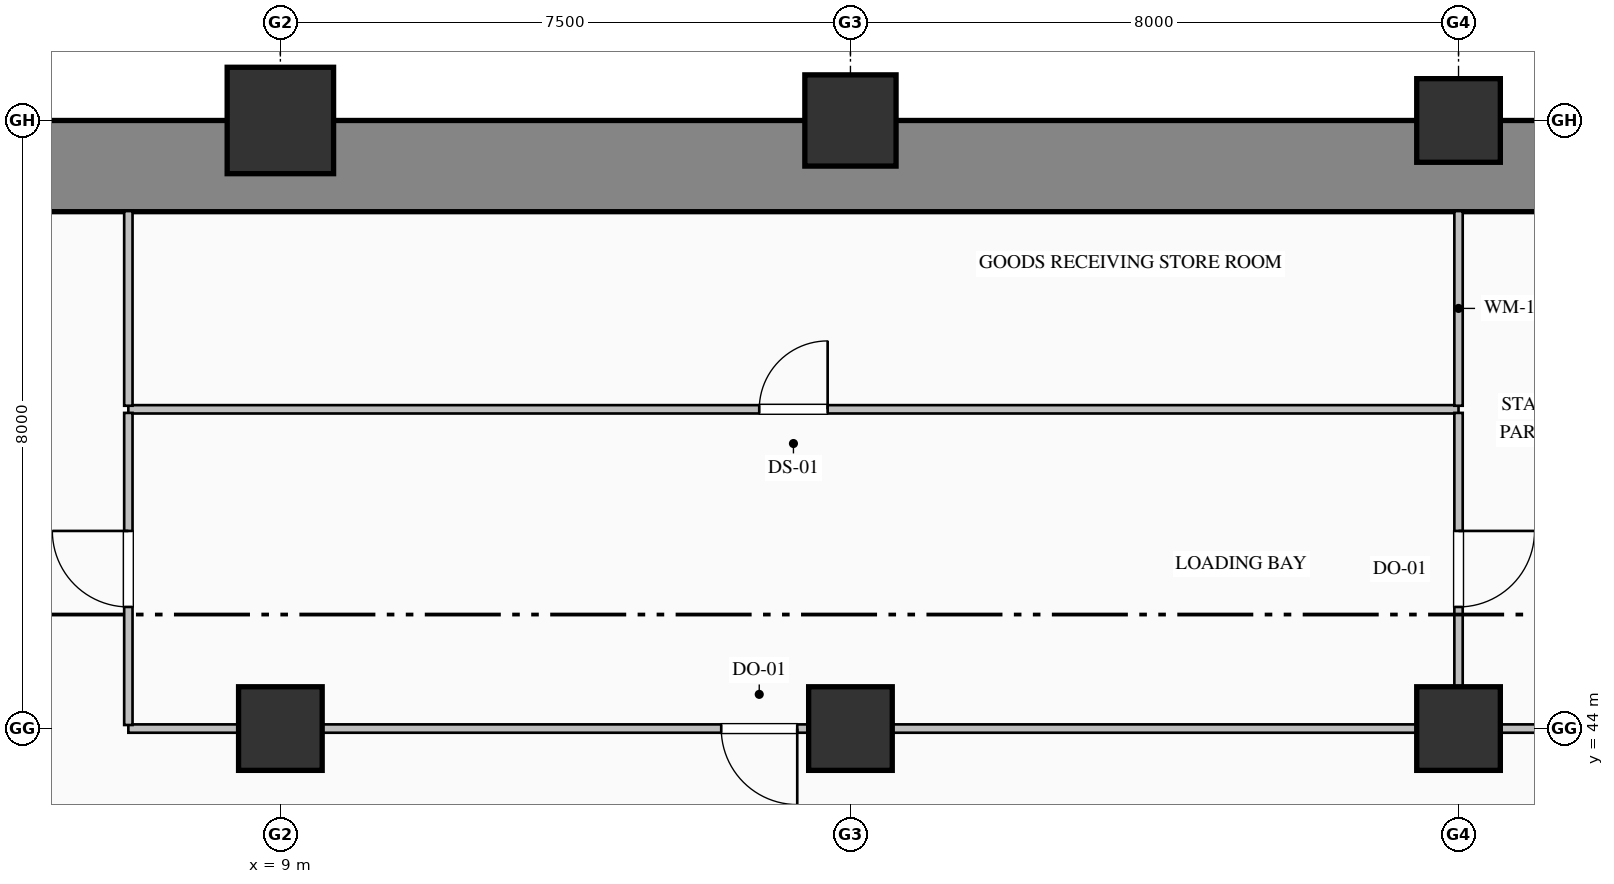
"""IFC4 building model, lengths in metres.
Left out: names, types, materials, properties, quantities, classifications, styles, units other than length and angle.
Written with IfcOpenShell. Run it as: python <this file> out.ifc"""

import sys

from ifc_helpers import new_model, si_unit, direction, frame, frame_2d, origin, origin_2d, place, context, subcontext, project, spatial, rectangle, hollow_rectangle, hollow_circle, extrude, element, fill, save


model = new_model("IFC4")
c1 = context("Model", 3, precision=1e-05, world=origin(), true_north=direction((0.0, 1.0)))
c2 = subcontext(c1, "Body", "Model", "MODEL_VIEW")
j1 = project(units=[si_unit("LENGTHUNIT", "METRE"), si_unit("PLANEANGLEUNIT", "RADIAN")], contexts=[c1])
p1 = place(None, origin())
s1 = spatial("IfcSite", under=j1, at=p1, CompositionType="ELEMENT")
p2 = place(p1, origin())
s2 = spatial("IfcBuilding", under=s1, at=p2, CompositionType="ELEMENT")
p3 = place(p2, frame((0.0, 0.0, -4.6)))
s3 = spatial("IfcBuildingStorey", under=s2, at=p3, CompositionType="ELEMENT", Elevation=-4.6)
p4 = place(p3, frame((-1.2, 51.4, 0.0), z_axis=(0.0, 0.0, 1.0), x_axis=(1.0, 0.0, 0.0)))
e1 = element("IfcWall", 1, at=p4, inside=s3, PredefinedType="USERDEFINED", context=c2, shape_type="SweptSolid", body=[
    extrude(rectangle(XDim=41.7, YDim=1.2, at=frame_2d((20.85, 0.0))), origin(), (0.0, 0.0, 1.0), 4.45),
])
p5 = place(p3, frame((9.0, 44.0, 0.0), z_axis=(0.0, 0.0, 1.0), x_axis=(1.0, 0.0, 0.0)))
e2 = element("IfcColumn", 2, at=p5, inside=s3, PredefinedType="COLUMN", context=c2, shape_type="SweptSolid", body=[
    extrude(rectangle(XDim=1.1, YDim=1.1, at=origin_2d()), origin(), (0.0, 0.0, 1.0), 4.6),
])
p6 = place(p3, frame((9.0, 52.0, 0.0), z_axis=(0.0, 0.0, 1.0), x_axis=(1.0, 0.0, 0.0)))
e3 = element("IfcColumn", 3, at=p6, inside=s3, PredefinedType="COLUMN", context=c2, shape_type="SweptSolid", body=[
    extrude(hollow_rectangle(XDim=1.4, YDim=1.4, WallThickness=0.05, at=origin_2d()), origin(), (0.0, 0.0, 1.0), 4.6),
])
p7 = place(p3, frame((16.5, 44.0, 0.0), z_axis=(0.0, 0.0, 1.0), x_axis=(1.0, 0.0, 0.0)))
e4 = element("IfcColumn", 4, at=p7, inside=s3, PredefinedType="COLUMN", context=c2, shape_type="SweptSolid", body=[
    extrude(rectangle(XDim=1.1, YDim=1.1, at=origin_2d()), origin(), (0.0, 0.0, 1.0), 4.6),
])
p8 = place(p3, frame((16.5, 52.0, 0.0), z_axis=(0.0, 0.0, 1.0), x_axis=(1.0, 0.0, 0.0)))
e5 = element("IfcColumn", 5, at=p8, inside=s3, PredefinedType="COLUMN", context=c2, shape_type="SweptSolid", body=[
    extrude(hollow_circle(Radius=0.6, WallThickness=0.04, at=origin_2d()), origin(), (0.0, 0.0, 1.0), 4.6),
])
p9 = place(p3, frame((24.5, 44.0, 0.0), z_axis=(0.0, 0.0, 1.0), x_axis=(1.0, 0.0, 0.0)))
e6 = element("IfcColumn", 6, at=p9, inside=s3, PredefinedType="COLUMN", context=c2, shape_type="SweptSolid", body=[
    extrude(rectangle(XDim=1.1, YDim=1.1, at=origin_2d()), origin(), (0.0, 0.0, 1.0), 4.6),
])
p10 = place(p3, frame((24.5, 52.0, 0.0), z_axis=(0.0, 0.0, 1.0), x_axis=(1.0, 0.0, 0.0)))
e7 = element("IfcColumn", 7, at=p10, inside=s3, PredefinedType="COLUMN", context=c2, shape_type="SweptSolid", body=[
    extrude(hollow_rectangle(XDim=1.1, YDim=1.1, WallThickness=0.04, at=origin_2d()), origin(), (0.0, 0.0, 1.0), 4.6),
])
p11 = place(p3, frame((7.0, 48.2, 0.0), z_axis=(0.0, 0.0, 1.0), x_axis=(1.0, 0.0, 0.0)))
e8 = element("IfcWall", 8, at=p11, inside=s3, PredefinedType="MOVABLE", context=c2, shape_type="SweptSolid", body=[
    extrude(rectangle(XDim=17.5, YDim=0.11, at=frame_2d((8.75, 0.0))), origin(), (0.0, 0.0, 1.0), 4.18),
])
p12 = place(p11, frame((8.3, 0.0, 0.0)))
e9 = element("IfcOpeningElement", 9, at=p12, cuts=e8, PredefinedType="OPENING", context=c2, shape_type="SweptSolid", body=[
    extrude(rectangle(XDim=0.9, YDim=2.15, at=frame_2d((0.45, 1.075))), frame((0.0, 0.065, 0.0), z_axis=(0.0, -1.0, 0.0), x_axis=(1.0, 0.0, 0.0)), (0.0, 0.0, 1.0), 0.13),
])
p13 = place(p3, frame((24.5, 48.153, 0.0), z_axis=(0.0, 0.0, 1.0), x_axis=(0.0, -1.0, 0.0)))
e10 = element("IfcWall", 10, at=p13, inside=s3, PredefinedType="MOVABLE", context=c2, shape_type="SweptSolid", body=[
    extrude(rectangle(XDim=4.106, YDim=0.11, at=frame_2d((2.053, 0.0))), origin(), (0.0, 0.0, 1.0), 3.272),
])
p14 = place(p13, frame((1.553, 0.0, 0.0)))
e11 = element("IfcOpeningElement", 11, at=p14, cuts=e10, PredefinedType="OPENING", context=c2, shape_type="SweptSolid", body=[
    extrude(rectangle(XDim=1.0, YDim=2.15, at=frame_2d((0.5, 1.075))), frame((0.0, 0.065, 0.0), z_axis=(0.0, -1.0, 0.0), x_axis=(1.0, 0.0, 0.0)), (0.0, 0.0, 1.0), 0.13),
])
p15 = place(p3, frame((24.5, 44.0, 0.0), z_axis=(0.0, 0.0, 1.0), x_axis=(-1.0, 0.0, 0.0)))
e12 = element("IfcWall", 12, at=p15, inside=s3, PredefinedType="MOVABLE", context=c2, shape_type="SweptSolid", body=[
    extrude(rectangle(XDim=17.5, YDim=0.11, at=frame_2d((8.75, 0.0))), origin(), (0.0, 0.0, 1.0), 3.272),
])
p16 = place(p15, frame((8.7, 0.0, 0.0)))
e13 = element("IfcOpeningElement", 13, at=p16, cuts=e12, PredefinedType="OPENING", context=c2, shape_type="SweptSolid", body=[
    extrude(rectangle(XDim=1.0, YDim=2.15, at=frame_2d((0.5, 1.075))), frame((0.0, 0.065, 0.0), z_axis=(0.0, -1.0, 0.0), x_axis=(1.0, 0.0, 0.0)), (0.0, 0.0, 1.0), 0.13),
])
p17 = place(p3, frame((7.0, 44.047, 0.0), z_axis=(0.0, 0.0, 1.0), x_axis=(0.0, 1.0, 0.0)))
e14 = element("IfcWall", 14, at=p17, inside=s3, PredefinedType="MOVABLE", context=c2, shape_type="SweptSolid", body=[
    extrude(rectangle(XDim=4.106, YDim=0.11, at=frame_2d((2.053, 0.0))), origin(), (0.0, 0.0, 1.0), 4.18),
])
p18 = place(p17, frame((1.553, 0.0, 0.0)))
e15 = element("IfcOpeningElement", 15, at=p18, cuts=e14, PredefinedType="OPENING", context=c2, shape_type="SweptSolid", body=[
    extrude(rectangle(XDim=1.0, YDim=2.15, at=frame_2d((0.5, 1.075))), frame((0.0, 0.065, 0.0), z_axis=(0.0, -1.0, 0.0), x_axis=(1.0, 0.0, 0.0)), (0.0, 0.0, 1.0), 0.13),
])
p19 = place(p3, frame((24.5, 50.808, 0.0), z_axis=(0.0, 0.0, 1.0), x_axis=(0.0, -1.0, 0.0)))
e16 = element("IfcWall", 16, at=p19, inside=s3, PredefinedType="MOVABLE", context=c2, shape_type="SweptSolid", body=[
    extrude(rectangle(XDim=2.561, YDim=0.11, at=frame_2d((1.281, 0.0))), origin(), (0.0, 0.0, 1.0), 3.272),
])
p20 = place(p3, frame((7.0, 48.247, 0.0), z_axis=(0.0, 0.0, 1.0), x_axis=(0.0, 1.0, 0.0)))
e17 = element("IfcWall", 17, at=p20, inside=s3, PredefinedType="MOVABLE", context=c2, shape_type="SweptSolid", body=[
    extrude(rectangle(XDim=2.561, YDim=0.11, at=frame_2d((1.281, 0.0))), origin(), (0.0, 0.0, 1.0), 4.18),
])
p21 = place(p3, frame((28.2, 44.0, 0.0), z_axis=(0.0, 0.0, 1.0), x_axis=(-1.0, 0.0, 0.0)))
e18 = element("IfcWall", 18, at=p21, inside=s3, PredefinedType="MOVABLE", context=c2, shape_type="SweptSolid", body=[
    extrude(rectangle(XDim=3.7, YDim=0.11, at=frame_2d((1.85, 0.0))), origin(), (0.0, 0.0, 1.0), 4.18),
])
p22 = place(p21, frame((1.35, 0.0, 0.0)))
e19 = element("IfcOpeningElement", 19, at=p22, cuts=e18, PredefinedType="OPENING", context=c2, shape_type="SweptSolid", body=[
    extrude(rectangle(XDim=1.0, YDim=2.15, at=frame_2d((0.5, 1.075))), frame((0.0, 0.065, 0.0), z_axis=(0.0, -1.0, 0.0), x_axis=(1.0, 0.0, 0.0)), (0.0, 0.0, 1.0), 0.13),
])
p23 = place(p16, origin())
e20 = element("IfcDoor", 20, at=p23, inside=s3, OperationType="SINGLE_SWING_LEFT", PredefinedType="DOOR", context=c2, shape_type="SweptSolid", body=[
    extrude(rectangle(XDim=1.0, YDim=2.15, at=frame_2d((0.5, 1.075))), frame((0.0, 0.025, 0.0), z_axis=(0.0, -1.0, 0.0), x_axis=(1.0, 0.0, 0.0)), (0.0, 0.0, 1.0), 0.05),
])
fill(e13, e20)
p24 = place(p14, origin())
e21 = element("IfcDoor", 21, at=p24, inside=s3, OperationType="SINGLE_SWING_LEFT", PredefinedType="DOOR", context=c2, shape_type="SweptSolid", body=[
    extrude(rectangle(XDim=1.0, YDim=2.15, at=frame_2d((0.5, 1.075))), frame((0.0, 0.025, 0.0), z_axis=(0.0, -1.0, 0.0), x_axis=(1.0, 0.0, 0.0)), (0.0, 0.0, 1.0), 0.05),
])
fill(e11, e21)
p25 = place(p18, origin())
e22 = element("IfcDoor", 22, at=p25, inside=s3, OperationType="SINGLE_SWING_RIGHT", PredefinedType="DOOR", context=c2, shape_type="SweptSolid", body=[
    extrude(rectangle(XDim=1.0, YDim=2.15, at=frame_2d((0.5, 1.075))), frame((0.0, 0.025, 0.0), z_axis=(0.0, -1.0, 0.0), x_axis=(1.0, 0.0, 0.0)), (0.0, 0.0, 1.0), 0.05),
])
fill(e15, e22)
p26 = place(p12, origin())
e23 = element("IfcDoor", 23, at=p26, inside=s3, OperationType="SINGLE_SWING_RIGHT", PredefinedType="DOOR", context=c2, shape_type="SweptSolid", body=[
    extrude(rectangle(XDim=0.9, YDim=2.15, at=frame_2d((0.45, 1.075))), frame((0.0, 0.025, 0.0), z_axis=(0.0, -1.0, 0.0), x_axis=(1.0, 0.0, 0.0)), (0.0, 0.0, 1.0), 0.05),
])
fill(e9, e23)
save(model, sys.argv[1])
